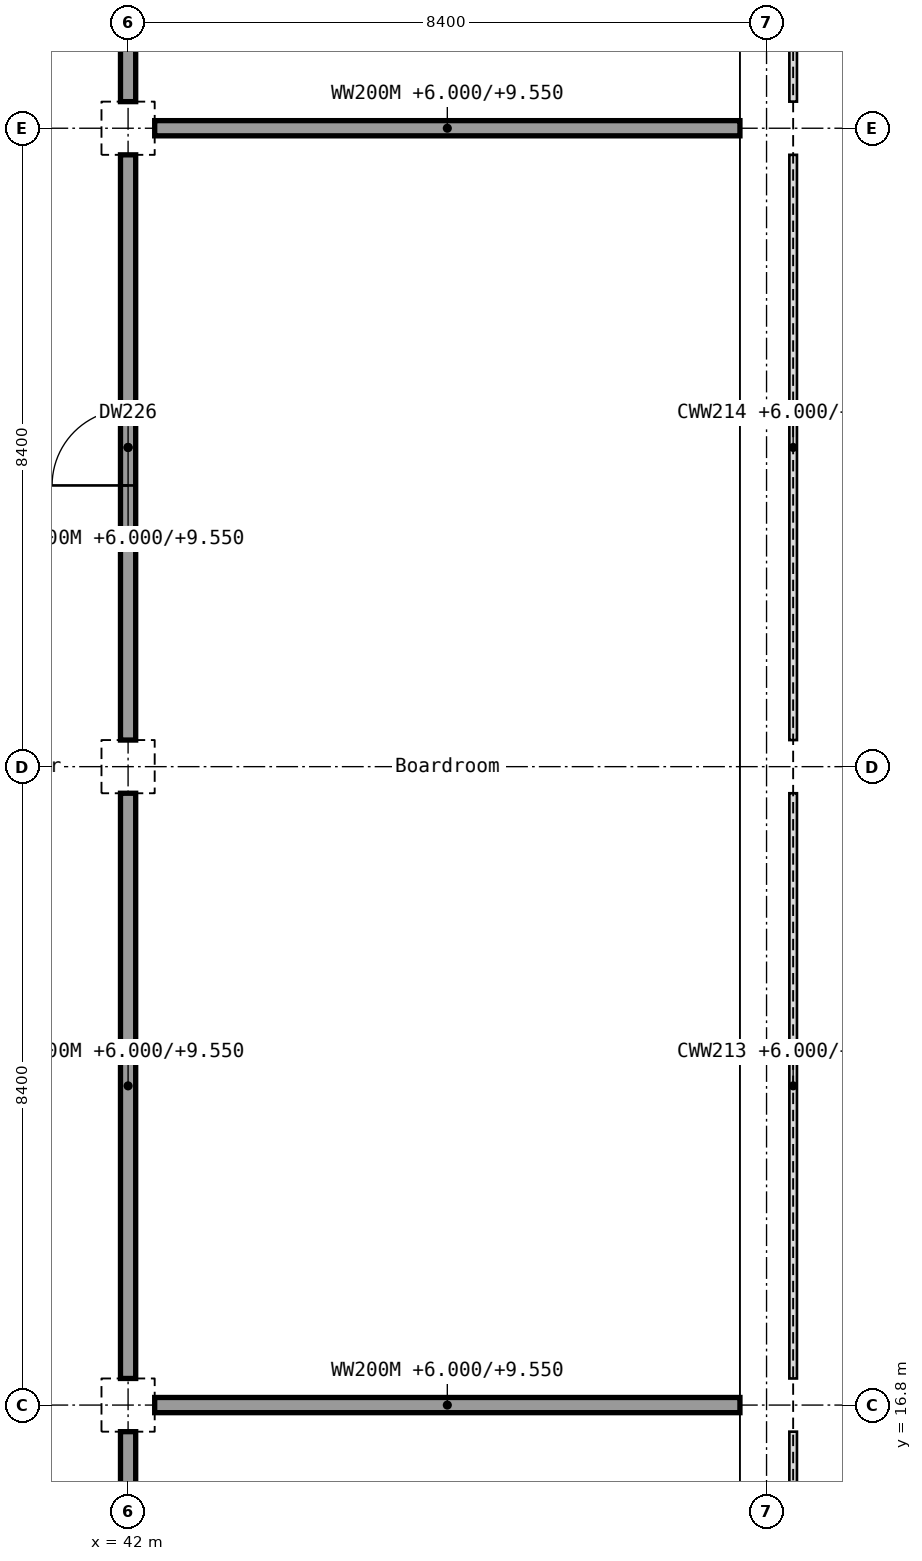
"""IFC4 building model, lengths in metres.
Left out: names, types, materials, properties, quantities, classifications, styles, units other than length and angle.
Written with IfcOpenShell. Run it as: python <this file> out.ifc"""

import sys

from ifc_helpers import new_model, si_unit, direction, frame, frame_2d, origin, origin_2d, place, context, subcontext, project, spatial, rectangle, extrude, element, fill, save


model = new_model("IFC4")
c1 = context("Model", 3, precision=1e-05, world=origin(), true_north=direction((0.0, 1.0)))
c2 = subcontext(c1, "Body", "Model", "MODEL_VIEW")
j1 = project(units=[si_unit("LENGTHUNIT", "METRE"), si_unit("PLANEANGLEUNIT", "RADIAN")], contexts=[c1])
p1 = place(None, origin())
s1 = spatial("IfcSite", under=j1, at=p1, CompositionType="ELEMENT")
p2 = place(p1, origin())
s2 = spatial("IfcBuilding", under=s1, at=p2, CompositionType="ELEMENT")
p3 = place(p2, frame((0.0, 0.0, 6.0)))
s3 = spatial("IfcBuildingStorey", under=s2, at=p3, CompositionType="ELEMENT", Elevation=6.0)
for number, where, z_axis, x_axis in (
    (1, (42.0, 16.8, 0.0), (0.0, 0.0, 1.0), (1.0, 0.0, 0.0)),
    (2, (42.0, 25.2, 0.0), (0.0, 0.0, 1.0), (1.0, 0.0, 0.0)),
    (3, (42.0, 33.6, 0.0), (0.0, 0.0, 1.0), (1.0, 0.0, 0.0)),
    (4, (50.4, 16.8, 0.0), (0.0, 0.0, 1.0), (1.0, 0.0, 0.0)),
    (5, (50.4, 25.2, 0.0), (0.0, 0.0, 1.0), (1.0, 0.0, 0.0)),
    (6, (50.4, 33.6, 0.0), (0.0, 0.0, 1.0), (1.0, 0.0, 0.0)),
):
    element("IfcColumn", number, at=place(p3, frame(where, z_axis=z_axis, x_axis=x_axis)), inside=s3, PredefinedType="COLUMN", context=c2, shape_type="SweptSolid", body=[
        extrude(rectangle(XDim=0.7, YDim=0.7, at=origin_2d()), origin(), (0.0, 0.0, 1.0), 4.5),
    ])
for number, where, z_axis, x_axis in (
    (7, (42.35, 16.8, 0.0), (0.0, 0.0, 1.0), (1.0, 0.0, 0.0)),
    (8, (42.35, 33.6, 0.0), (0.0, 0.0, 1.0), (1.0, 0.0, 0.0)),
):
    element("IfcWall", number, at=place(p3, frame(where, z_axis=z_axis, x_axis=x_axis)), inside=s3, PredefinedType="PARTITIONING", context=c2, shape_type="SweptSolid", body=[
        extrude(rectangle(XDim=7.7, YDim=0.2, at=frame_2d((3.85, 0.0))), origin(), (0.0, 0.0, 1.0), 3.55),
    ])
p4 = place(p3, frame((42.0, 11.4, 0.0), z_axis=(0.0, 0.0, 1.0), x_axis=(0.0, 1.0, 0.0)))
e9 = element("IfcWall", 9, at=p4, inside=s3, PredefinedType="PARTITIONING", context=c2, shape_type="SweptSolid", body=[
    extrude(rectangle(XDim=5.05, YDim=0.2, at=frame_2d((2.525, 0.0))), origin(), (0.0, 0.0, 1.0), 3.55),
])
p5 = place(p4, frame((2.025, 0.0, 0.0)))
e10 = element("IfcOpeningElement", 10, at=p5, cuts=e9, PredefinedType="OPENING", context=c2, shape_type="SweptSolid", body=[
    extrude(rectangle(XDim=1.0, YDim=2.1, at=frame_2d((0.5, 1.05))), frame((0.0, 0.1, 0.0), z_axis=(0.0, -1.0, 0.0), x_axis=(1.0, 0.0, 0.0)), (0.0, 0.0, 1.0), 0.2),
])
p6 = place(p3, frame((42.0, 17.15, 0.0), z_axis=(0.0, 0.0, 1.0), x_axis=(0.0, 1.0, 0.0)))
e11 = element("IfcWall", 11, at=p6, inside=s3, PredefinedType="PARTITIONING", context=c2, shape_type="SweptSolid", body=[
    extrude(rectangle(XDim=7.7, YDim=0.2, at=frame_2d((3.85, 0.0))), origin(), (0.0, 0.0, 1.0), 3.55),
])
p7 = place(p3, frame((42.0, 25.55, 0.0), z_axis=(0.0, 0.0, 1.0), x_axis=(0.0, 1.0, 0.0)))
e12 = element("IfcWall", 12, at=p7, inside=s3, PredefinedType="PARTITIONING", context=c2, shape_type="SweptSolid", body=[
    extrude(rectangle(XDim=7.7, YDim=0.2, at=frame_2d((3.85, 0.0))), origin(), (0.0, 0.0, 1.0), 3.55),
])
p8 = place(p7, frame((3.35, 0.0, 0.0)))
e13 = element("IfcOpeningElement", 13, at=p8, cuts=e12, PredefinedType="OPENING", context=c2, shape_type="SweptSolid", body=[
    extrude(rectangle(XDim=1.0, YDim=2.1, at=frame_2d((0.5, 1.05))), frame((0.0, 0.1, 0.0), z_axis=(0.0, -1.0, 0.0), x_axis=(1.0, 0.0, 0.0)), (0.0, 0.0, 1.0), 0.2),
])
p9 = place(p3, frame((42.0, 33.95, 0.0), z_axis=(0.0, 0.0, 1.0), x_axis=(0.0, 1.0, 0.0)))
e14 = element("IfcWall", 14, at=p9, inside=s3, PredefinedType="PARTITIONING", context=c2, shape_type="SweptSolid", body=[
    extrude(rectangle(XDim=5.05, YDim=0.2, at=frame_2d((2.525, 0.0))), origin(), (0.0, 0.0, 1.0), 3.55),
])
p10 = place(p9, frame((2.025, 0.0, 0.0)))
e15 = element("IfcOpeningElement", 15, at=p10, cuts=e14, PredefinedType="OPENING", context=c2, shape_type="SweptSolid", body=[
    extrude(rectangle(XDim=1.0, YDim=2.1, at=frame_2d((0.5, 1.05))), frame((0.0, 0.1, 0.0), z_axis=(0.0, -1.0, 0.0), x_axis=(1.0, 0.0, 0.0)), (0.0, 0.0, 1.0), 0.2),
])
p11 = place(p8, origin())
e16 = element("IfcDoor", 16, at=p11, inside=s3, OperationType="SINGLE_SWING_LEFT", PredefinedType="DOOR", context=c2, shape_type="SweptSolid", body=[
    extrude(rectangle(XDim=1.0, YDim=2.1, at=frame_2d((0.5, 1.05))), frame((0.0, 0.025, 0.0), z_axis=(0.0, -1.0, 0.0), x_axis=(1.0, 0.0, 0.0)), (0.0, 0.0, 1.0), 0.05),
])
fill(e13, e16)
save(model, sys.argv[1])
